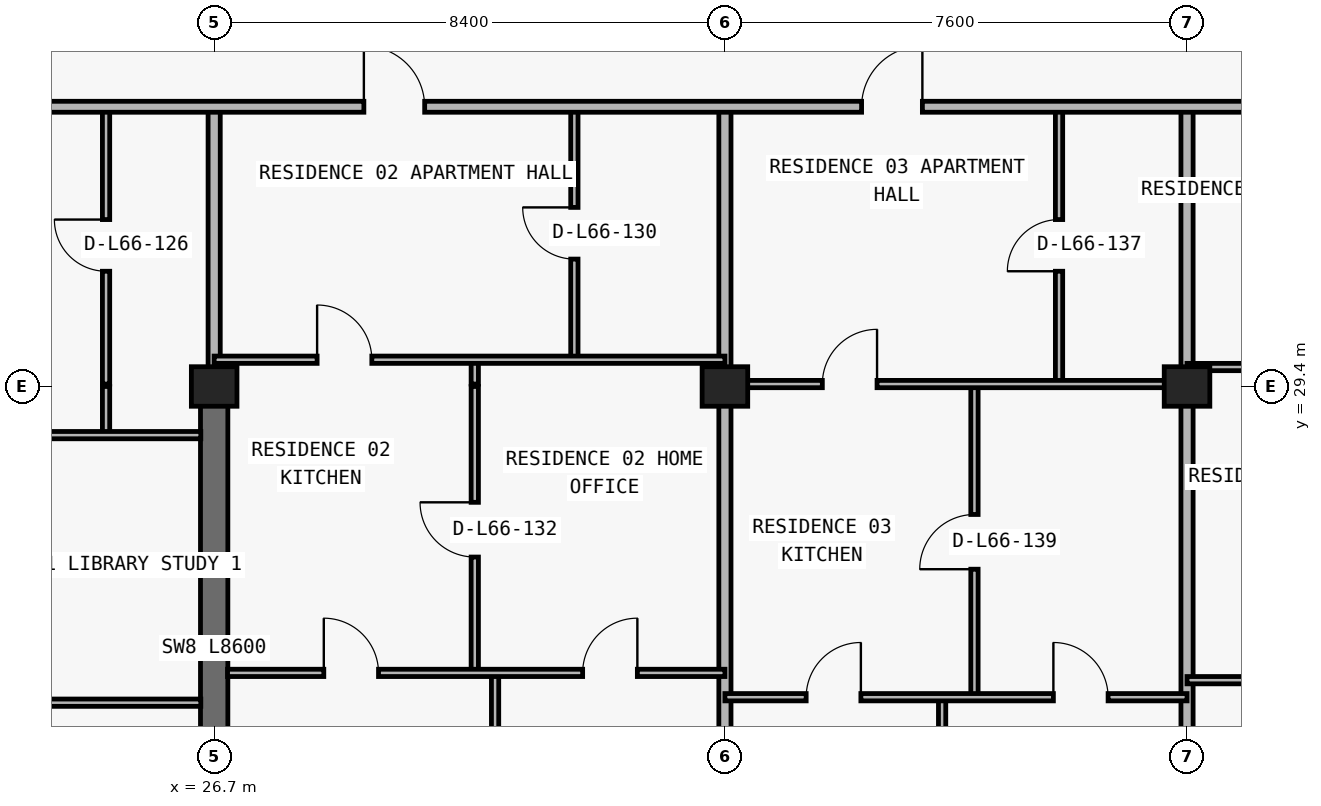
"""IFC4 building model, lengths in metres.
Left out: names, types, materials, properties, quantities, classifications, styles, units other than length and angle.
Written with IfcOpenShell. Run it as: python <this file> out.ifc"""

import sys

from ifc_helpers import new_model, si_unit, direction, frame, frame_2d, origin, origin_2d, place, context, subcontext, project, spatial, rectangle, extrude, element, fill, save


model = new_model("IFC4")
c1 = context("Model", 3, precision=1e-05, world=origin(), true_north=direction((0.0, 1.0)))
c2 = subcontext(c1, "Body", "Model", "MODEL_VIEW")
j1 = project(units=[si_unit("LENGTHUNIT", "METRE"), si_unit("PLANEANGLEUNIT", "RADIAN")], contexts=[c1])
p1 = place(None, origin())
s1 = spatial("IfcSite", under=j1, at=p1, CompositionType="ELEMENT")
p2 = place(p1, origin())
s2 = spatial("IfcBuilding", under=s1, at=p2, CompositionType="ELEMENT")
p3 = place(p2, frame((0.0, 0.0, 236.4)))
s3 = spatial("IfcBuildingStorey", under=s2, at=p3, CompositionType="ELEMENT", Elevation=236.4)
for number, where, z_axis, x_axis in (
    (1, (26.7, 29.4, 0.0), (0.0, 0.0, 1.0), (1.0, 0.0, 0.0)),
    (2, (35.1, 29.4, 0.0), (0.0, 0.0, 1.0), (1.0, 0.0, 0.0)),
    (3, (42.7, 29.4, 0.0), (0.0, 0.0, 1.0), (1.0, 0.0, 0.0)),
):
    element("IfcColumn", number, at=place(p3, frame(where, z_axis=z_axis, x_axis=x_axis)), inside=s3, PredefinedType="COLUMN", context=c2, shape_type="SweptSolid", body=[
        extrude(rectangle(XDim=0.75, YDim=0.65, at=origin_2d()), origin(), (0.0, 0.0, 1.0), 3.05),
    ])
p4 = place(p3, frame((26.7, 20.8, 0.0), z_axis=(0.0, 0.0, 1.0), x_axis=(0.0, 1.0, 0.0)))
e4 = element("IfcWall", 4, at=p4, inside=s3, PredefinedType="SHEAR", context=c2, shape_type="SweptSolid", body=[
    extrude(rectangle(XDim=8.6, YDim=0.45, at=frame_2d((4.3, 0.0))), origin(), (0.0, 0.0, 1.0), 3.05),
])
p5 = place(p3, frame((24.922, 28.6, 0.0), z_axis=(0.0, 0.0, 1.0), x_axis=(0.0, 1.0, 0.0)))
e5 = element("IfcWall", 5, at=p5, inside=s3, PredefinedType="PARTITIONING", context=c2, shape_type="SweptSolid", body=[
    extrude(rectangle(XDim=0.8, YDim=0.12, at=frame_2d((0.4, 0.0))), origin(), (0.0, 0.0, 1.0), 3.05),
])
p6 = place(p3, frame((24.922, 29.44, 0.0), z_axis=(0.0, 0.0, 1.0), x_axis=(0.0, 1.0, 0.0)))
e6 = element("IfcWall", 6, at=p6, inside=s3, PredefinedType="PARTITIONING", context=c2, shape_type="SweptSolid", body=[
    extrude(rectangle(XDim=4.56, YDim=0.12, at=frame_2d((2.28, 0.0))), origin(), (0.0, 0.0, 1.0), 3.05),
])
p7 = place(p6, frame((1.855, 0.0, 0.0)))
e7 = element("IfcOpeningElement", 7, at=p7, cuts=e6, PredefinedType="OPENING", context=c2, shape_type="SweptSolid", body=[
    extrude(rectangle(XDim=0.85, YDim=2.1, at=frame_2d((0.425, 1.05))), frame((0.0, 0.07, 0.0), z_axis=(0.0, -1.0, 0.0), x_axis=(1.0, 0.0, 0.0)), (0.0, 0.0, 1.0), 0.14),
])
p8 = place(p3, frame((26.7, 29.44, 0.0), z_axis=(0.0, 0.0, 1.0), x_axis=(0.0, 1.0, 0.0)))
e8 = element("IfcWall", 8, at=p8, inside=s3, PredefinedType="PARTITIONING", context=c2, shape_type="SweptSolid", body=[
    extrude(rectangle(XDim=4.56, YDim=0.2, at=frame_2d((2.28, 0.0))), origin(), (0.0, 0.0, 1.0), 2.335),
])
p9 = place(p3, frame((30.986, 24.69, 0.0), z_axis=(0.0, 0.0, 1.0), x_axis=(0.0, 1.0, 0.0)))
e9 = element("IfcWall", 9, at=p9, inside=s3, PredefinedType="PARTITIONING", context=c2, shape_type="SweptSolid", body=[
    extrude(rectangle(XDim=4.71, YDim=0.12, at=frame_2d((2.355, 0.0))), origin(), (0.0, 0.0, 1.0), 3.05),
])
p10 = place(p9, frame((1.905, 0.0, 0.0)))
e10 = element("IfcOpeningElement", 10, at=p10, cuts=e9, PredefinedType="OPENING", context=c2, shape_type="SweptSolid", body=[
    extrude(rectangle(XDim=0.9, YDim=2.15, at=frame_2d((0.45, 1.075))), frame((0.0, 0.07, 0.0), z_axis=(0.0, -1.0, 0.0), x_axis=(1.0, 0.0, 0.0)), (0.0, 0.0, 1.0), 0.14),
])
p11 = place(p3, frame((30.986, 29.44, 0.0), z_axis=(0.0, 0.0, 1.0), x_axis=(0.0, 1.0, 0.0)))
e11 = element("IfcWall", 11, at=p11, inside=s3, PredefinedType="PARTITIONING", context=c2, shape_type="SweptSolid", body=[
    extrude(rectangle(XDim=0.4, YDim=0.12, at=frame_2d((0.2, 0.0))), origin(), (0.0, 0.0, 1.0), 2.725),
])
p12 = place(p3, frame((31.32, 13.34, 0.0), z_axis=(0.0, 0.0, 1.0), x_axis=(0.0, 1.0, 0.0)))
e12 = element("IfcWall", 12, at=p12, inside=s3, PredefinedType="PARTITIONING", context=c2, shape_type="SweptSolid", body=[
    extrude(rectangle(XDim=11.35, YDim=0.12, at=frame_2d((5.675, 0.0))), origin(), (0.0, 0.0, 1.0), 3.05),
])
p13 = place(p3, frame((32.624, 29.84, 0.0), z_axis=(0.0, 0.0, 1.0), x_axis=(0.0, 1.0, 0.0)))
e13 = element("IfcWall", 13, at=p13, inside=s3, PredefinedType="PARTITIONING", context=c2, shape_type="SweptSolid", body=[
    extrude(rectangle(XDim=4.16, YDim=0.12, at=frame_2d((2.08, 0.0))), origin(), (0.0, 0.0, 1.0), 3.05),
])
p14 = place(p13, frame((1.655, 0.0, 0.0)))
e14 = element("IfcOpeningElement", 14, at=p14, cuts=e13, PredefinedType="OPENING", context=c2, shape_type="SweptSolid", body=[
    extrude(rectangle(XDim=0.85, YDim=2.1, at=frame_2d((0.425, 1.05))), frame((0.0, 0.07, 0.0), z_axis=(0.0, -1.0, 0.0), x_axis=(1.0, 0.0, 0.0)), (0.0, 0.0, 1.0), 0.14),
])
p15 = place(p3, frame((35.1, 13.34, 0.0), z_axis=(0.0, 0.0, 1.0), x_axis=(0.0, 1.0, 0.0)))
e15 = element("IfcWall", 15, at=p15, inside=s3, PredefinedType="PARTITIONING", context=c2, shape_type="SweptSolid", body=[
    extrude(rectangle(XDim=16.06, YDim=0.2, at=frame_2d((8.03, 0.0))), origin(), (0.0, 0.0, 1.0), 2.263),
])
p16 = place(p3, frame((35.1, 29.44, 0.0), z_axis=(0.0, 0.0, 1.0), x_axis=(0.0, 1.0, 0.0)))
e16 = element("IfcWall", 16, at=p16, inside=s3, PredefinedType="PARTITIONING", context=c2, shape_type="SweptSolid", body=[
    extrude(rectangle(XDim=4.56, YDim=0.2, at=frame_2d((2.28, 0.0))), origin(), (0.0, 0.0, 1.0), 2.263),
])
p17 = place(p3, frame((38.672, 13.34, 0.0), z_axis=(0.0, 0.0, 1.0), x_axis=(0.0, 1.0, 0.0)))
e17 = element("IfcWall", 17, at=p17, inside=s3, PredefinedType="PARTITIONING", context=c2, shape_type="SweptSolid", body=[
    extrude(rectangle(XDim=10.95, YDim=0.12, at=frame_2d((5.475, 0.0))), origin(), (0.0, 0.0, 1.0), 3.05),
])
p18 = place(p3, frame((39.204, 24.29, 0.0), z_axis=(0.0, 0.0, 1.0), x_axis=(0.0, 1.0, 0.0)))
e18 = element("IfcWall", 18, at=p18, inside=s3, PredefinedType="PARTITIONING", context=c2, shape_type="SweptSolid", body=[
    extrude(rectangle(XDim=5.11, YDim=0.12, at=frame_2d((2.555, 0.0))), origin(), (0.0, 0.0, 1.0), 3.05),
])
p19 = place(p18, frame((2.105, 0.0, 0.0)))
e19 = element("IfcOpeningElement", 19, at=p19, cuts=e18, PredefinedType="OPENING", context=c2, shape_type="SweptSolid", body=[
    extrude(rectangle(XDim=0.9, YDim=2.15, at=frame_2d((0.45, 1.075))), frame((0.0, 0.07, 0.0), z_axis=(0.0, -1.0, 0.0), x_axis=(1.0, 0.0, 0.0)), (0.0, 0.0, 1.0), 0.14),
])
p20 = place(p3, frame((40.595, 29.44, 0.0), z_axis=(0.0, 0.0, 1.0), x_axis=(0.0, 1.0, 0.0)))
e20 = element("IfcWall", 20, at=p20, inside=s3, PredefinedType="PARTITIONING", context=c2, shape_type="SweptSolid", body=[
    extrude(rectangle(XDim=4.56, YDim=0.12, at=frame_2d((2.28, 0.0))), origin(), (0.0, 0.0, 1.0), 3.05),
])
p21 = place(p20, frame((1.855, 0.0, 0.0)))
e21 = element("IfcOpeningElement", 21, at=p21, cuts=e20, PredefinedType="OPENING", context=c2, shape_type="SweptSolid", body=[
    extrude(rectangle(XDim=0.85, YDim=2.1, at=frame_2d((0.425, 1.05))), frame((0.0, 0.07, 0.0), z_axis=(0.0, -1.0, 0.0), x_axis=(1.0, 0.0, 0.0)), (0.0, 0.0, 1.0), 0.14),
])
p22 = place(p3, frame((42.7, 13.34, 0.0), z_axis=(0.0, 0.0, 1.0), x_axis=(0.0, 1.0, 0.0)))
e22 = element("IfcWall", 22, at=p22, inside=s3, PredefinedType="PARTITIONING", context=c2, shape_type="SweptSolid", body=[
    extrude(rectangle(XDim=16.06, YDim=0.2, at=frame_2d((8.03, 0.0))), origin(), (0.0, 0.0, 1.0), 2.263),
])
p23 = place(p3, frame((42.7, 29.44, 0.0), z_axis=(0.0, 0.0, 1.0), x_axis=(0.0, 1.0, 0.0)))
e23 = element("IfcWall", 23, at=p23, inside=s3, PredefinedType="PARTITIONING", context=c2, shape_type="SweptSolid", body=[
    extrude(rectangle(XDim=4.56, YDim=0.2, at=frame_2d((2.28, 0.0))), origin(), (0.0, 0.0, 1.0), 2.263),
])
p24 = place(p3, frame((18.305, 24.2, 0.0), z_axis=(0.0, 0.0, 1.0), x_axis=(1.0, 0.0, 0.0)))
e24 = element("IfcWall", 24, at=p24, inside=s3, PredefinedType="PARTITIONING", context=c2, shape_type="SweptSolid", body=[
    extrude(rectangle(XDim=8.175, YDim=0.12, at=frame_2d((4.087, 0.0))), origin(), (0.0, 0.0, 1.0), 3.05),
])
p25 = place(p24, frame((3.637, 0.0, 0.0)))
e25 = element("IfcOpeningElement", 25, at=p25, cuts=e24, PredefinedType="OPENING", context=c2, shape_type="SweptSolid", body=[
    extrude(rectangle(XDim=0.9, YDim=2.15, at=frame_2d((0.45, 1.075))), frame((0.0, 0.07, 0.0), z_axis=(0.0, -1.0, 0.0), x_axis=(1.0, 0.0, 0.0)), (0.0, 0.0, 1.0), 0.14),
])
p26 = place(p3, frame((35.1, 24.29, 0.0), z_axis=(0.0, 0.0, 1.0), x_axis=(1.0, 0.0, 0.0)))
e26 = element("IfcWall", 26, at=p26, inside=s3, PredefinedType="PARTITIONING", context=c2, shape_type="SweptSolid", body=[
    extrude(rectangle(XDim=7.6, YDim=0.12, at=frame_2d((3.8, 0.0))), origin(), (0.0, 0.0, 1.0), 3.05),
])
p27 = place(p26, frame((1.336, 0.0, 0.0)))
e27 = element("IfcOpeningElement", 27, at=p27, cuts=e26, PredefinedType="OPENING", context=c2, shape_type="SweptSolid", body=[
    extrude(rectangle(XDim=0.9, YDim=2.15, at=frame_2d((0.45, 1.075))), frame((0.0, 0.07, 0.0), z_axis=(0.0, -1.0, 0.0), x_axis=(1.0, 0.0, 0.0)), (0.0, 0.0, 1.0), 0.14),
])
p28 = place(p26, frame((5.402, 0.0, 0.0)))
e28 = element("IfcOpeningElement", 28, at=p28, cuts=e26, PredefinedType="OPENING", context=c2, shape_type="SweptSolid", body=[
    extrude(rectangle(XDim=0.9, YDim=2.15, at=frame_2d((0.45, 1.075))), frame((0.0, 0.07, 0.0), z_axis=(0.0, -1.0, 0.0), x_axis=(1.0, 0.0, 0.0)), (0.0, 0.0, 1.0), 0.14),
])
p29 = place(p3, frame((42.7, 24.57, 0.0), z_axis=(0.0, 0.0, 1.0), x_axis=(1.0, 0.0, 0.0)))
e29 = element("IfcWall", 29, at=p29, inside=s3, PredefinedType="PARTITIONING", context=c2, shape_type="SweptSolid", body=[
    extrude(rectangle(XDim=8.18, YDim=0.12, at=frame_2d((4.09, 0.0))), origin(), (0.0, 0.0, 1.0), 3.05),
])
p30 = place(p29, frame((1.86, 0.0, 0.0)))
e30 = element("IfcOpeningElement", 30, at=p30, cuts=e29, PredefinedType="OPENING", context=c2, shape_type="SweptSolid", body=[
    extrude(rectangle(XDim=0.9, YDim=2.15, at=frame_2d((0.45, 1.075))), frame((0.0, 0.07, 0.0), z_axis=(0.0, -1.0, 0.0), x_axis=(1.0, 0.0, 0.0)), (0.0, 0.0, 1.0), 0.14),
])
p31 = place(p29, frame((6.033, 0.0, 0.0)))
e31 = element("IfcOpeningElement", 31, at=p31, cuts=e29, PredefinedType="OPENING", context=c2, shape_type="SweptSolid", body=[
    extrude(rectangle(XDim=0.9, YDim=2.15, at=frame_2d((0.45, 1.075))), frame((0.0, 0.07, 0.0), z_axis=(0.0, -1.0, 0.0), x_axis=(1.0, 0.0, 0.0)), (0.0, 0.0, 1.0), 0.14),
])
p32 = place(p3, frame((26.92, 24.69, 0.0), z_axis=(0.0, 0.0, 1.0), x_axis=(1.0, 0.0, 0.0)))
e32 = element("IfcWall", 32, at=p32, inside=s3, PredefinedType="PARTITIONING", context=c2, shape_type="SweptSolid", body=[
    extrude(rectangle(XDim=8.18, YDim=0.12, at=frame_2d((4.09, 0.0))), origin(), (0.0, 0.0, 1.0), 3.05),
])
p33 = place(p32, frame((1.583, 0.0, 0.0)))
e33 = element("IfcOpeningElement", 33, at=p33, cuts=e32, PredefinedType="OPENING", context=c2, shape_type="SweptSolid", body=[
    extrude(rectangle(XDim=0.9, YDim=2.15, at=frame_2d((0.45, 1.075))), frame((0.0, 0.07, 0.0), z_axis=(0.0, -1.0, 0.0), x_axis=(1.0, 0.0, 0.0)), (0.0, 0.0, 1.0), 0.14),
])
p34 = place(p32, frame((5.84, 0.0, 0.0)))
e34 = element("IfcOpeningElement", 34, at=p34, cuts=e32, PredefinedType="OPENING", context=c2, shape_type="SweptSolid", body=[
    extrude(rectangle(XDim=0.9, YDim=2.15, at=frame_2d((0.45, 1.075))), frame((0.0, 0.07, 0.0), z_axis=(0.0, -1.0, 0.0), x_axis=(1.0, 0.0, 0.0)), (0.0, 0.0, 1.0), 0.14),
])
p35 = place(p3, frame((18.3, 28.6, 0.0), z_axis=(0.0, 0.0, 1.0), x_axis=(1.0, 0.0, 0.0)))
e35 = element("IfcWall", 35, at=p35, inside=s3, PredefinedType="PARTITIONING", context=c2, shape_type="SweptSolid", body=[
    extrude(rectangle(XDim=8.18, YDim=0.12, at=frame_2d((4.09, 0.0))), origin(), (0.0, 0.0, 1.0), 3.05),
])
p36 = place(p35, frame((2.861, 0.0, 0.0)))
e36 = element("IfcOpeningElement", 36, at=p36, cuts=e35, PredefinedType="OPENING", context=c2, shape_type="SweptSolid", body=[
    extrude(rectangle(XDim=0.9, YDim=2.15, at=frame_2d((0.45, 1.075))), frame((0.0, 0.07, 0.0), z_axis=(0.0, -1.0, 0.0), x_axis=(1.0, 0.0, 0.0)), (0.0, 0.0, 1.0), 0.14),
])
p37 = place(p3, frame((35.1, 29.44, 0.0), z_axis=(0.0, 0.0, 1.0), x_axis=(1.0, 0.0, 0.0)))
e37 = element("IfcWall", 37, at=p37, inside=s3, PredefinedType="PARTITIONING", context=c2, shape_type="SweptSolid", body=[
    extrude(rectangle(XDim=7.6, YDim=0.12, at=frame_2d((3.8, 0.0))), origin(), (0.0, 0.0, 1.0), 2.263),
])
p38 = place(p37, frame((1.602, 0.0, 0.0)))
e38 = element("IfcOpeningElement", 38, at=p38, cuts=e37, PredefinedType="OPENING", context=c2, shape_type="SweptSolid", body=[
    extrude(rectangle(XDim=0.9, YDim=2.15, at=frame_2d((0.45, 1.075))), frame((0.0, 0.07, 0.0), z_axis=(0.0, -1.0, 0.0), x_axis=(1.0, 0.0, 0.0)), (0.0, 0.0, 1.0), 0.14),
])
p39 = place(p3, frame((42.7, 29.72, 0.0), z_axis=(0.0, 0.0, 1.0), x_axis=(1.0, 0.0, 0.0)))
e39 = element("IfcWall", 39, at=p39, inside=s3, PredefinedType="PARTITIONING", context=c2, shape_type="SweptSolid", body=[
    extrude(rectangle(XDim=8.4, YDim=0.12, at=frame_2d((4.2, 0.0))), origin(), (0.0, 0.0, 1.0), 2.263),
])
p40 = place(p39, frame((1.943, 0.0, 0.0)))
e40 = element("IfcOpeningElement", 40, at=p40, cuts=e39, PredefinedType="OPENING", context=c2, shape_type="SweptSolid", body=[
    extrude(rectangle(XDim=0.9, YDim=2.15, at=frame_2d((0.45, 1.075))), frame((0.0, 0.07, 0.0), z_axis=(0.0, -1.0, 0.0), x_axis=(1.0, 0.0, 0.0)), (0.0, 0.0, 1.0), 0.14),
])
p41 = place(p3, frame((26.7, 29.84, 0.0), z_axis=(0.0, 0.0, 1.0), x_axis=(1.0, 0.0, 0.0)))
e41 = element("IfcWall", 41, at=p41, inside=s3, PredefinedType="PARTITIONING", context=c2, shape_type="SweptSolid", body=[
    extrude(rectangle(XDim=8.4, YDim=0.12, at=frame_2d((4.2, 0.0))), origin(), (0.0, 0.0, 1.0), 3.05),
])
p42 = place(p41, frame((1.693, 0.0, 0.0)))
e42 = element("IfcOpeningElement", 42, at=p42, cuts=e41, PredefinedType="OPENING", context=c2, shape_type="SweptSolid", body=[
    extrude(rectangle(XDim=0.9, YDim=2.15, at=frame_2d((0.45, 1.075))), frame((0.0, 0.07, 0.0), z_axis=(0.0, -1.0, 0.0), x_axis=(1.0, 0.0, 0.0)), (0.0, 0.0, 1.0), 0.14),
])
p43 = place(p3, frame((12.105, 34.0, 0.0), z_axis=(0.0, 0.0, 1.0), x_axis=(1.0, 0.0, 0.0)))
e43 = element("IfcWall", 43, at=p43, inside=s3, PredefinedType="PARTITIONING", context=c2, shape_type="SweptSolid", body=[
    extrude(rectangle(XDim=53.595, YDim=0.18, at=frame_2d((26.797, 0.0))), origin(), (0.0, 0.0, 1.0), 3.05),
])
p44 = place(p43, frame((1.607, 0.0, 0.0)))
e44 = element("IfcOpeningElement", 44, at=p44, cuts=e43, PredefinedType="OPENING", context=c2, shape_type="SweptSolid", body=[
    extrude(rectangle(XDim=1.0, YDim=2.2, at=frame_2d((0.5, 1.1))), frame((0.0, 0.1, 0.0), z_axis=(0.0, -1.0, 0.0), x_axis=(1.0, 0.0, 0.0)), (0.0, 0.0, 1.0), 0.2),
])
p45 = place(p43, frame((17.057, 0.0, 0.0)))
e45 = element("IfcOpeningElement", 45, at=p45, cuts=e43, PredefinedType="OPENING", context=c2, shape_type="SweptSolid", body=[
    extrude(rectangle(XDim=1.0, YDim=2.2, at=frame_2d((0.5, 1.1))), frame((0.0, 0.1, 0.0), z_axis=(0.0, -1.0, 0.0), x_axis=(1.0, 0.0, 0.0)), (0.0, 0.0, 1.0), 0.2),
])
p46 = place(p43, frame((25.242, 0.0, 0.0)))
e46 = element("IfcOpeningElement", 46, at=p46, cuts=e43, PredefinedType="OPENING", context=c2, shape_type="SweptSolid", body=[
    extrude(rectangle(XDim=1.0, YDim=2.2, at=frame_2d((0.5, 1.1))), frame((0.0, 0.1, 0.0), z_axis=(0.0, -1.0, 0.0), x_axis=(1.0, 0.0, 0.0)), (0.0, 0.0, 1.0), 0.2),
])
p47 = place(p43, frame((33.092, 0.0, 0.0)))
e47 = element("IfcOpeningElement", 47, at=p47, cuts=e43, PredefinedType="OPENING", context=c2, shape_type="SweptSolid", body=[
    extrude(rectangle(XDim=1.0, YDim=2.2, at=frame_2d((0.5, 1.1))), frame((0.0, 0.1, 0.0), z_axis=(0.0, -1.0, 0.0), x_axis=(1.0, 0.0, 0.0)), (0.0, 0.0, 1.0), 0.2),
])
p48 = place(p43, frame((41.705, 0.0, 0.0)))
e48 = element("IfcOpeningElement", 48, at=p48, cuts=e43, PredefinedType="OPENING", context=c2, shape_type="SweptSolid", body=[
    extrude(rectangle(XDim=1.0, YDim=2.2, at=frame_2d((0.5, 1.1))), frame((0.0, 0.1, 0.0), z_axis=(0.0, -1.0, 0.0), x_axis=(1.0, 0.0, 0.0)), (0.0, 0.0, 1.0), 0.2),
])
p49 = place(p7, origin())
e49 = element("IfcDoor", 49, at=p49, inside=s3, OperationType="SINGLE_SWING_RIGHT", PredefinedType="DOOR", context=c2, shape_type="SweptSolid", body=[
    extrude(rectangle(XDim=0.85, YDim=2.1, at=frame_2d((0.425, 1.05))), frame((0.0, 0.025, 0.0), z_axis=(0.0, -1.0, 0.0), x_axis=(1.0, 0.0, 0.0)), (0.0, 0.0, 1.0), 0.05),
])
fill(e7, e49)
p50 = place(p45, origin())
e50 = element("IfcDoor", 50, at=p50, inside=s3, OperationType="SINGLE_SWING_LEFT", PredefinedType="DOOR", context=c2, shape_type="SweptSolid", body=[
    extrude(rectangle(XDim=1.0, YDim=2.2, at=frame_2d((0.5, 1.1))), frame((0.0, 0.025, 0.0), z_axis=(0.0, -1.0, 0.0), x_axis=(1.0, 0.0, 0.0)), (0.0, 0.0, 1.0), 0.05),
])
fill(e45, e50)
p51 = place(p14, origin())
e51 = element("IfcDoor", 51, at=p51, inside=s3, OperationType="SINGLE_SWING_RIGHT", PredefinedType="DOOR", context=c2, shape_type="SweptSolid", body=[
    extrude(rectangle(XDim=0.85, YDim=2.1, at=frame_2d((0.425, 1.05))), frame((0.0, 0.025, 0.0), z_axis=(0.0, -1.0, 0.0), x_axis=(1.0, 0.0, 0.0)), (0.0, 0.0, 1.0), 0.05),
])
fill(e14, e51)
p52 = place(p42, origin())
e52 = element("IfcDoor", 52, at=p52, inside=s3, OperationType="SINGLE_SWING_LEFT", PredefinedType="DOOR", context=c2, shape_type="SweptSolid", body=[
    extrude(rectangle(XDim=0.9, YDim=2.15, at=frame_2d((0.45, 1.075))), frame((0.0, 0.025, 0.0), z_axis=(0.0, -1.0, 0.0), x_axis=(1.0, 0.0, 0.0)), (0.0, 0.0, 1.0), 0.05),
])
fill(e42, e52)
p53 = place(p10, origin())
e53 = element("IfcDoor", 53, at=p53, inside=s3, OperationType="SINGLE_SWING_RIGHT", PredefinedType="DOOR", context=c2, shape_type="SweptSolid", body=[
    extrude(rectangle(XDim=0.9, YDim=2.15, at=frame_2d((0.45, 1.075))), frame((0.0, 0.025, 0.0), z_axis=(0.0, -1.0, 0.0), x_axis=(1.0, 0.0, 0.0)), (0.0, 0.0, 1.0), 0.05),
])
fill(e10, e53)
p54 = place(p33, origin())
e54 = element("IfcDoor", 54, at=p54, inside=s3, OperationType="SINGLE_SWING_LEFT", PredefinedType="DOOR", context=c2, shape_type="SweptSolid", body=[
    extrude(rectangle(XDim=0.9, YDim=2.15, at=frame_2d((0.45, 1.075))), frame((0.0, 0.025, 0.0), z_axis=(0.0, -1.0, 0.0), x_axis=(1.0, 0.0, 0.0)), (0.0, 0.0, 1.0), 0.05),
])
fill(e33, e54)
p55 = place(p34, origin())
e55 = element("IfcDoor", 55, at=p55, inside=s3, OperationType="SINGLE_SWING_RIGHT", PredefinedType="DOOR", context=c2, shape_type="SweptSolid", body=[
    extrude(rectangle(XDim=0.9, YDim=2.15, at=frame_2d((0.45, 1.075))), frame((0.0, 0.025, 0.0), z_axis=(0.0, -1.0, 0.0), x_axis=(1.0, 0.0, 0.0)), (0.0, 0.0, 1.0), 0.05),
])
fill(e34, e55)
p56 = place(p46, origin())
e56 = element("IfcDoor", 56, at=p56, inside=s3, OperationType="SINGLE_SWING_RIGHT", PredefinedType="DOOR", context=c2, shape_type="SweptSolid", body=[
    extrude(rectangle(XDim=1.0, YDim=2.2, at=frame_2d((0.5, 1.1))), frame((0.0, 0.025, 0.0), z_axis=(0.0, -1.0, 0.0), x_axis=(1.0, 0.0, 0.0)), (0.0, 0.0, 1.0), 0.05),
])
fill(e46, e56)
p57 = place(p21, origin())
e57 = element("IfcDoor", 57, at=p57, inside=s3, OperationType="SINGLE_SWING_LEFT", PredefinedType="DOOR", context=c2, shape_type="SweptSolid", body=[
    extrude(rectangle(XDim=0.85, YDim=2.1, at=frame_2d((0.425, 1.05))), frame((0.0, 0.025, 0.0), z_axis=(0.0, -1.0, 0.0), x_axis=(1.0, 0.0, 0.0)), (0.0, 0.0, 1.0), 0.05),
])
fill(e21, e57)
p58 = place(p38, origin())
e58 = element("IfcDoor", 58, at=p58, inside=s3, OperationType="SINGLE_SWING_RIGHT", PredefinedType="DOOR", context=c2, shape_type="SweptSolid", body=[
    extrude(rectangle(XDim=0.9, YDim=2.15, at=frame_2d((0.45, 1.075))), frame((0.0, 0.025, 0.0), z_axis=(0.0, -1.0, 0.0), x_axis=(1.0, 0.0, 0.0)), (0.0, 0.0, 1.0), 0.05),
])
fill(e38, e58)
p59 = place(p19, origin())
e59 = element("IfcDoor", 59, at=p59, inside=s3, OperationType="SINGLE_SWING_LEFT", PredefinedType="DOOR", context=c2, shape_type="SweptSolid", body=[
    extrude(rectangle(XDim=0.9, YDim=2.15, at=frame_2d((0.45, 1.075))), frame((0.0, 0.025, 0.0), z_axis=(0.0, -1.0, 0.0), x_axis=(1.0, 0.0, 0.0)), (0.0, 0.0, 1.0), 0.05),
])
fill(e19, e59)
p60 = place(p27, origin())
e60 = element("IfcDoor", 60, at=p60, inside=s3, OperationType="SINGLE_SWING_RIGHT", PredefinedType="DOOR", context=c2, shape_type="SweptSolid", body=[
    extrude(rectangle(XDim=0.9, YDim=2.15, at=frame_2d((0.45, 1.075))), frame((0.0, 0.025, 0.0), z_axis=(0.0, -1.0, 0.0), x_axis=(1.0, 0.0, 0.0)), (0.0, 0.0, 1.0), 0.05),
])
fill(e27, e60)
p61 = place(p28, origin())
e61 = element("IfcDoor", 61, at=p61, inside=s3, OperationType="SINGLE_SWING_LEFT", PredefinedType="DOOR", context=c2, shape_type="SweptSolid", body=[
    extrude(rectangle(XDim=0.9, YDim=2.15, at=frame_2d((0.45, 1.075))), frame((0.0, 0.025, 0.0), z_axis=(0.0, -1.0, 0.0), x_axis=(1.0, 0.0, 0.0)), (0.0, 0.0, 1.0), 0.05),
])
fill(e28, e61)
save(model, sys.argv[1])
